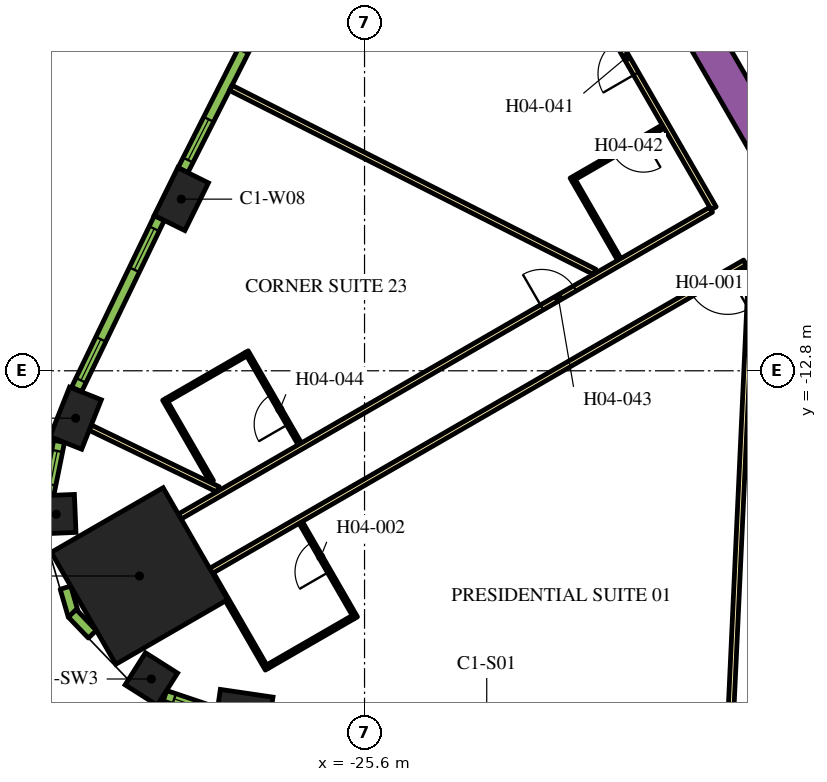
"""IFC4 building model, lengths in metres.
Left out: names, types, materials, properties, quantities, classifications, styles, units other than length and angle.
Written with IfcOpenShell. Run it as: python <this file> out.ifc"""

import sys

from ifc_helpers import new_model, si_unit, direction, frame, frame_2d, origin, origin_2d, place, context, subcontext, project, spatial, rectangle, extrude, element, fill, save


model = new_model("IFC4")
c1 = context("Model", 3, precision=1e-05, world=origin(), true_north=direction((0.0, 1.0)))
c2 = subcontext(c1, "Body", "Model", "MODEL_VIEW")
j1 = project(units=[si_unit("LENGTHUNIT", "METRE"), si_unit("PLANEANGLEUNIT", "RADIAN")], contexts=[c1])
p1 = place(None, origin())
s1 = spatial("IfcSite", under=j1, at=p1, CompositionType="ELEMENT")
p2 = place(p1, origin())
s2 = spatial("IfcBuilding", under=s1, at=p2, CompositionType="ELEMENT")
p3 = place(p2, frame((0.0, 0.0, 70.5)))
s3 = spatial("IfcBuildingStorey", under=s2, at=p3, CompositionType="ELEMENT", Elevation=70.5)
p4 = place(p3, frame((-31.522, -18.199, 0.0), z_axis=(0.0, 0.0, 1.0), x_axis=(-0.866025403784, -0.5, 0.0)))
e1 = element("IfcColumn", 1, at=p4, inside=s3, PredefinedType="COLUMN", context=c2, shape_type="SweptSolid", body=[
    extrude(rectangle(XDim=3.4, YDim=3.4, at=origin_2d()), origin(), (0.0, 0.0, 1.0), 3.9),
])
for number, where, z_axis, x_axis in (
    (2, (-28.767, -21.731, 0.0), (0.0, 0.0, 1.0), (0.989, -0.145, 0.0)),
    (3, (-30.421, -8.284, 0.0), (0.0, 0.0, 1.0), (-0.443, -0.897, 0.0)),
    (4, (-33.203, -14.047, 0.0), (0.0, 0.0, 1.0), (-0.369, -0.929, 0.0)),
):
    element("IfcColumn", number, at=place(p3, frame(where, z_axis=z_axis, x_axis=x_axis)), inside=s3, PredefinedType="COLUMN", context=c2, shape_type="SweptSolid", body=[
        extrude(rectangle(XDim=1.4, YDim=0.9, at=origin_2d()), origin(), (0.0, 0.0, 1.0), 3.9),
    ])
for number, where, z_axis, x_axis in (
    (5, (-33.713, -16.574, 0.0), (0.0, 0.0, 1.0), (0.042, -0.999, 0.0)),
    (6, (-31.21, -20.91, 0.0), (0.0, 0.0, 1.0), (0.844, -0.536, 0.0)),
):
    element("IfcColumn", number, at=place(p3, frame(where, z_axis=z_axis, x_axis=x_axis)), inside=s3, PredefinedType="COLUMN", context=c2, shape_type="SweptSolid", body=[
        extrude(rectangle(XDim=1.0, YDim=1.0, at=origin_2d()), origin(), (0.0, 0.0, 1.0), 3.9),
    ])
p5 = place(p3, frame((-12.134, -11.883, 0.0), z_axis=(0.0, 0.0, 1.0), x_axis=(-0.500005339912, 0.866022320763, 0.0)))
e7 = element("IfcWall", 7, at=p5, inside=s3, PredefinedType="SOLIDWALL", context=c2, shape_type="SweptSolid", body=[
    extrude(rectangle(XDim=9.488, YDim=0.9, at=frame_2d((4.744, 0.0))), origin(), (0.0, 0.0, 1.0), 3.9),
])
p6 = place(p3, frame((-16.412, -8.523, 0.0), z_axis=(0.0, 0.0, 1.0), x_axis=(-0.500001929737, 0.866024289647, 0.0)))
e8 = element("IfcWall", 8, at=p6, inside=s3, PredefinedType="PARTITIONING", context=c2, shape_type="SweptSolid", body=[
    extrude(rectangle(XDim=5.268, YDim=0.15, at=frame_2d((2.634, 0.0))), origin(), (0.0, 0.0, 1.0), 2.75),
])
p7 = place(p6, frame((4.088, 0.0, 0.0)))
e9 = element("IfcOpeningElement", 9, at=p7, cuts=e8, PredefinedType="OPENING", context=c2, shape_type="SweptSolid", body=[
    extrude(rectangle(XDim=1.0, YDim=2.1, at=frame_2d((0.5, 1.05))), frame((0.0, 0.085, 0.0), z_axis=(0.0, -1.0, 0.0), x_axis=(1.0, 0.0, 0.0)), (0.0, 0.0, 1.0), 0.17),
])
p8 = place(p3, frame((-30.463, -16.635, 0.0), z_axis=(0.0, 0.0, 1.0), x_axis=(0.866022394896, 0.500005211512, 0.0)))
e10 = element("IfcWall", 10, at=p8, inside=s3, PredefinedType="PARTITIONING", context=c2, shape_type="SweptSolid", body=[
    extrude(rectangle(XDim=16.144, YDim=0.15, at=frame_2d((8.072, 0.0))), origin(), (0.0, 0.0, 1.0), 2.75),
])
p9 = place(p8, frame((11.004, 0.0, 0.0)))
e11 = element("IfcOpeningElement", 11, at=p9, cuts=e10, PredefinedType="OPENING", context=c2, shape_type="SweptSolid", body=[
    extrude(rectangle(XDim=1.0, YDim=2.1, at=frame_2d((0.5, 1.05))), frame((0.0, 0.085, 0.0), z_axis=(0.0, -1.0, 0.0), x_axis=(1.0, 0.0, 0.0)), (0.0, 0.0, 1.0), 0.17),
])
p10 = place(p3, frame((-15.587, -9.952, 0.0), z_axis=(0.0, 0.0, 1.0), x_axis=(-0.866022197818, -0.500005552856, 0.0)))
e12 = element("IfcWall", 12, at=p10, inside=s3, PredefinedType="PARTITIONING", context=c2, shape_type="SweptSolid", body=[
    extrude(rectangle(XDim=16.224, YDim=0.15, at=frame_2d((8.112, 0.0))), origin(), (0.0, 0.0, 1.0), 2.75),
])
p11 = place(p10, frame((0.527, 0.0, 0.0)))
e13 = element("IfcOpeningElement", 13, at=p11, cuts=e12, PredefinedType="OPENING", context=c2, shape_type="SweptSolid", body=[
    extrude(rectangle(XDim=1.1, YDim=2.1, at=frame_2d((0.55, 1.05))), frame((0.0, 0.085, 0.0), z_axis=(0.0, -1.0, 0.0), x_axis=(1.0, 0.0, 0.0)), (0.0, 0.0, 1.0), 0.17),
])
p12 = place(p3, frame((-12.918, -14.575, 0.0), z_axis=(0.0, 0.0, 1.0), x_axis=(-0.500009150678, 0.866020120573, 0.0)))
e14 = element("IfcWall", 14, at=p12, inside=s3, PredefinedType="PARTITIONING", context=c2, shape_type="SweptSolid", body=[
    extrude(rectangle(XDim=5.258, YDim=0.15, at=frame_2d((2.629, 0.0))), origin(), (0.0, 0.0, 1.0), 2.75),
])
p13 = place(p3, frame((-32.817, -14.296, 0.0), z_axis=(0.0, 0.0, 1.0), x_axis=(0.900616957918, -0.434613730927, 0.0)))
e15 = element("IfcWall", 15, at=p13, inside=s3, PredefinedType="PARTITIONING", context=c2, shape_type="SweptSolid", body=[
    extrude(rectangle(XDim=3.733, YDim=0.15, at=frame_2d((1.867, 0.0))), origin(), (0.0, 0.0, 1.0), 2.75),
])
p14 = place(p3, frame((-29.12, -5.356, 0.0), z_axis=(0.0, 0.0, 1.0), x_axis=(0.892401965553, -0.451241323327, 0.0)))
e16 = element("IfcWall", 16, at=p14, inside=s3, PredefinedType="PARTITIONING", context=c2, shape_type="SweptSolid", body=[
    extrude(rectangle(XDim=10.729, YDim=0.15, at=frame_2d((5.364, 0.0))), origin(), (0.0, 0.0, 1.0), 2.75),
])
p15 = place(p3, frame((-15.973, -22.109, 0.0), z_axis=(0.0, 0.0, 1.0), x_axis=(0.046191717129, 0.998932592955, 0.0)))
e17 = element("IfcWall", 17, at=p15, inside=s3, PredefinedType="PARTITIONING", context=c2, shape_type="SweptSolid", body=[
    extrude(rectangle(XDim=11.638, YDim=0.15, at=frame_2d((5.819, 0.0))), origin(), (0.0, 0.0, 1.0), 2.75),
])
p16 = place(p3, frame((-25.829, -19.3, 0.0), z_axis=(0.0, 0.0, 1.0), x_axis=(-0.50005036918, 0.865996321171, 0.0)))
e18 = element("IfcWall", 18, at=p16, inside=s3, PredefinedType="PARTITIONING", context=c2, shape_type="SweptSolid", body=[
    extrude(rectangle(XDim=2.9, YDim=0.1, at=frame_2d((1.45, 0.0))), origin(), (0.0, 0.0, 1.0), 2.75),
])
p17 = place(p16, frame((1.4, 0.0, 0.0)))
e19 = element("IfcOpeningElement", 19, at=p17, cuts=e18, PredefinedType="OPENING", context=c2, shape_type="SweptSolid", body=[
    extrude(rectangle(XDim=0.9, YDim=2.1, at=frame_2d((0.45, 1.05))), frame((0.0, 0.06, 0.0), z_axis=(0.0, -1.0, 0.0), x_axis=(1.0, 0.0, 0.0)), (0.0, 0.0, 1.0), 0.12),
])
p18 = place(p3, frame((-25.897, -19.282, 0.0), z_axis=(0.0, 0.0, 1.0), x_axis=(-0.866021400173, -0.500006934395, 0.0)))
e20 = element("IfcWall", 20, at=p18, inside=s3, PredefinedType="PARTITIONING", context=c2, shape_type="SweptSolid", body=[
    extrude(rectangle(XDim=2.6, YDim=0.1, at=frame_2d((1.3, 0.0))), origin(), (0.0, 0.0, 1.0), 2.75),
])
p19 = place(p3, frame((-29.617, -18.139, 0.0), z_axis=(0.0, 0.0, 1.0), x_axis=(0.499987231761, -0.866032775405, 0.0)))
e21 = element("IfcWall", 21, at=p19, inside=s3, PredefinedType="PARTITIONING", context=c2, shape_type="SweptSolid", body=[
    extrude(rectangle(XDim=2.9, YDim=0.1, at=frame_2d((1.45, 0.0))), origin(), (0.0, 0.0, 1.0), 2.75),
])
p20 = place(p3, frame((-17.74, -6.373, 0.0), z_axis=(0.0, 0.0, 1.0), x_axis=(-0.866018616679, -0.500011755427, 0.0)))
e22 = element("IfcWall", 22, at=p20, inside=s3, PredefinedType="PARTITIONING", context=c2, shape_type="SweptSolid", body=[
    extrude(rectangle(XDim=2.8, YDim=0.1, at=frame_2d((1.4, 0.0))), origin(), (0.0, 0.0, 1.0), 2.75),
])
p21 = place(p20, frame((0.6, 0.0, 0.0)))
e23 = element("IfcOpeningElement", 23, at=p21, cuts=e22, PredefinedType="OPENING", context=c2, shape_type="SweptSolid", body=[
    extrude(rectangle(XDim=0.9, YDim=2.1, at=frame_2d((0.45, 1.05))), frame((0.0, 0.06, 0.0), z_axis=(0.0, -1.0, 0.0), x_axis=(1.0, 0.0, 0.0)), (0.0, 0.0, 1.0), 0.12),
])
p22 = place(p3, frame((-20.092, -7.8, 0.0), z_axis=(0.0, 0.0, 1.0), x_axis=(0.499940577336, -0.866059708757, 0.0)))
e24 = element("IfcWall", 24, at=p22, inside=s3, PredefinedType="PARTITIONING", context=c2, shape_type="SweptSolid", body=[
    extrude(rectangle(XDim=2.39, YDim=0.1, at=frame_2d((1.195, 0.0))), origin(), (0.0, 0.0, 1.0), 2.75),
])
p23 = place(p3, frame((-27.304, -14.725, 0.0), z_axis=(0.0, 0.0, 1.0), x_axis=(-0.49998411664, 0.866034573852, 0.0)))
e25 = element("IfcWall", 25, at=p23, inside=s3, PredefinedType="PARTITIONING", context=c2, shape_type="SweptSolid", body=[
    extrude(rectangle(XDim=2.8, YDim=0.1, at=frame_2d((1.4, 0.0))), origin(), (0.0, 0.0, 1.0), 2.75),
])
p24 = place(p23, frame((0.6, 0.0, 0.0)))
e26 = element("IfcOpeningElement", 26, at=p24, cuts=e25, PredefinedType="OPENING", context=c2, shape_type="SweptSolid", body=[
    extrude(rectangle(XDim=0.9, YDim=2.1, at=frame_2d((0.45, 1.05))), frame((0.0, 0.06, 0.0), z_axis=(0.0, -1.0, 0.0), x_axis=(1.0, 0.0, 0.0)), (0.0, 0.0, 1.0), 0.12),
])
p25 = place(p3, frame((-28.722, -12.368, 0.0), z_axis=(0.0, 0.0, 1.0), x_axis=(-0.866050077142, -0.499957262057, 0.0)))
e27 = element("IfcWall", 27, at=p25, inside=s3, PredefinedType="PARTITIONING", context=c2, shape_type="SweptSolid", body=[
    extrude(rectangle(XDim=2.4, YDim=0.1, at=frame_2d((1.2, 0.0))), origin(), (0.0, 0.0, 1.0), 2.75),
])
p26 = place(p3, frame((-29.619, -15.715, 0.0), z_axis=(0.0, 0.0, 1.0), x_axis=(-0.500004234368, 0.866022959057, 0.0)))
e28 = element("IfcWall", 28, at=p26, inside=s3, PredefinedType="PARTITIONING", context=c2, shape_type="SweptSolid", body=[
    extrude(rectangle(XDim=2.5, YDim=0.1, at=frame_2d((1.25, 0.0))), origin(), (0.0, 0.0, 1.0), 2.75),
])
p27 = place(p3, frame((-28.122, -3.06, 0.0), z_axis=(0.0, 0.0, 1.0), x_axis=(-0.451233929645, -0.892405704115, 0.0)))
e29 = element("IfcWall", 29, at=p27, inside=s3, PredefinedType="SOLIDWALL", context=c2, shape_type="SweptSolid", body=[
    extrude(rectangle(XDim=4.998, YDim=0.29, at=frame_2d((2.499, 0.0))), origin(), (0.0, 0.0, 1.0), 3.65),
])
p28 = place(p27, frame((0.297, 0.0, 0.9)))
e30 = element("IfcOpeningElement", 30, at=p28, cuts=e29, PredefinedType="OPENING", context=c2, shape_type="SweptSolid", body=[
    extrude(rectangle(XDim=1.2, YDim=2.15, at=frame_2d((0.6, 1.075))), frame((0.0, 0.155, 0.0), z_axis=(0.0, -1.0, 0.0), x_axis=(1.0, 0.0, 0.0)), (0.0, 0.0, 1.0), 0.31),
])
p29 = place(p27, frame((3.501, 0.0, 0.9)))
e31 = element("IfcOpeningElement", 31, at=p29, cuts=e29, PredefinedType="OPENING", context=c2, shape_type="SweptSolid", body=[
    extrude(rectangle(XDim=1.2, YDim=2.15, at=frame_2d((0.6, 1.075))), frame((0.0, 0.155, 0.0), z_axis=(0.0, -1.0, 0.0), x_axis=(1.0, 0.0, 0.0)), (0.0, 0.0, 1.0), 0.31),
])
p30 = place(p3, frame((-31.0, -8.782, 0.0), z_axis=(0.0, 0.0, 1.0), x_axis=(-0.434664499056, -0.900592456808, 0.0)))
e32 = element("IfcWall", 32, at=p30, inside=s3, PredefinedType="SOLIDWALL", context=c2, shape_type="SweptSolid", body=[
    extrude(rectangle(XDim=5.006, YDim=0.29, at=frame_2d((2.503, 0.0))), origin(), (0.0, 0.0, 1.0), 3.65),
])
p31 = place(p30, frame((0.31, 0.0, 0.9)))
e33 = element("IfcOpeningElement", 33, at=p31, cuts=e32, PredefinedType="OPENING", context=c2, shape_type="SweptSolid", body=[
    extrude(rectangle(XDim=1.2, YDim=2.15, at=frame_2d((0.6, 1.075))), frame((0.0, 0.155, 0.0), z_axis=(0.0, -1.0, 0.0), x_axis=(1.0, 0.0, 0.0)), (0.0, 0.0, 1.0), 0.31),
])
p32 = place(p30, frame((3.541, 0.0, 0.9)))
e34 = element("IfcOpeningElement", 34, at=p32, cuts=e32, PredefinedType="OPENING", context=c2, shape_type="SweptSolid", body=[
    extrude(rectangle(XDim=1.2, YDim=2.15, at=frame_2d((0.6, 1.075))), frame((0.0, 0.155, 0.0), z_axis=(0.0, -1.0, 0.0), x_axis=(1.0, 0.0, 0.0)), (0.0, 0.0, 1.0), 0.31),
])
p33 = place(p3, frame((-33.637, -14.657, 0.0), z_axis=(0.0, 0.0, 1.0), x_axis=(-0.198106888228, -0.980180422594, 0.0)))
e35 = element("IfcWall", 35, at=p33, inside=s3, PredefinedType="SOLIDWALL", context=c2, shape_type="SweptSolid", body=[
    extrude(rectangle(XDim=1.415, YDim=0.29, at=frame_2d((0.708, 0.0))), origin(), (0.0, 0.0, 1.0), 3.65),
])
p34 = place(p33, frame((0.257, 0.0, 0.9)))
e36 = element("IfcOpeningElement", 36, at=p34, cuts=e35, PredefinedType="OPENING", context=c2, shape_type="SweptSolid", body=[
    extrude(rectangle(XDim=0.9, YDim=2.15, at=frame_2d((0.45, 1.075))), frame((0.0, 0.155, 0.0), z_axis=(0.0, -1.0, 0.0), x_axis=(1.0, 0.0, 0.0)), (0.0, 0.0, 1.0), 0.31),
])
for number, where, z_axis, x_axis in (
    (37, (-33.47, -18.507, 0.0), (0.0, 0.0, 1.0), (0.279, -0.96, 0.0)),
    (38, (-33.291, -19.181, 0.0), (0.0, 0.0, 1.0), (0.692, -0.722, 0.0)),
):
    element("IfcWall", number, at=place(p3, frame(where, z_axis=z_axis, x_axis=x_axis)), inside=s3, PredefinedType="SOLIDWALL", context=c2, shape_type="SweptSolid", body=[
        extrude(rectangle(XDim=0.764, YDim=0.29, at=frame_2d((0.382, 0.0))), origin(), (0.0, 0.0, 1.0), 3.65),
    ])
p35 = place(p3, frame((-30.853, -21.352, 0.0), z_axis=(0.0, 0.0, 1.0), x_axis=(0.947903891592, -0.318556450734, 0.0)))
e39 = element("IfcWall", 39, at=p35, inside=s3, PredefinedType="SOLIDWALL", context=c2, shape_type="SweptSolid", body=[
    extrude(rectangle(XDim=1.415, YDim=0.29, at=frame_2d((0.708, 0.0))), origin(), (0.0, 0.0, 1.0), 3.65),
])
p36 = place(p35, frame((0.257, 0.0, 0.9)))
e40 = element("IfcOpeningElement", 40, at=p36, cuts=e39, PredefinedType="OPENING", context=c2, shape_type="SweptSolid", body=[
    extrude(rectangle(XDim=0.9, YDim=2.15, at=frame_2d((0.45, 1.075))), frame((0.0, 0.155, 0.0), z_axis=(0.0, -1.0, 0.0), x_axis=(1.0, 0.0, 0.0)), (0.0, 0.0, 1.0), 0.31),
])
p37 = place(p11, origin())
e41 = element("IfcDoor", 41, at=p37, inside=s3, OperationType="SINGLE_SWING_LEFT", PredefinedType="DOOR", context=c2, shape_type="SweptSolid", body=[
    extrude(rectangle(XDim=1.1, YDim=2.1, at=frame_2d((0.55, 1.05))), frame((0.0, 0.025, 0.0), z_axis=(0.0, -1.0, 0.0), x_axis=(1.0, 0.0, 0.0)), (0.0, 0.0, 1.0), 0.05),
])
fill(e13, e41)
p38 = place(p17, origin())
e42 = element("IfcDoor", 42, at=p38, inside=s3, OperationType="SINGLE_SWING_LEFT", PredefinedType="DOOR", context=c2, shape_type="SweptSolid", body=[
    extrude(rectangle(XDim=0.9, YDim=2.1, at=frame_2d((0.45, 1.05))), frame((0.0, 0.025, 0.0), z_axis=(0.0, -1.0, 0.0), x_axis=(1.0, 0.0, 0.0)), (0.0, 0.0, 1.0), 0.05),
])
fill(e19, e42)
p39 = place(p7, origin())
e43 = element("IfcDoor", 43, at=p39, inside=s3, OperationType="SINGLE_SWING_RIGHT", PredefinedType="DOOR", context=c2, shape_type="SweptSolid", body=[
    extrude(rectangle(XDim=1.0, YDim=2.1, at=frame_2d((0.5, 1.05))), frame((0.0, 0.025, 0.0), z_axis=(0.0, -1.0, 0.0), x_axis=(1.0, 0.0, 0.0)), (0.0, 0.0, 1.0), 0.05),
])
fill(e9, e43)
p40 = place(p21, origin())
e44 = element("IfcDoor", 44, at=p40, inside=s3, OperationType="SINGLE_SWING_LEFT", PredefinedType="DOOR", context=c2, shape_type="SweptSolid", body=[
    extrude(rectangle(XDim=0.9, YDim=2.1, at=frame_2d((0.45, 1.05))), frame((0.0, 0.025, 0.0), z_axis=(0.0, -1.0, 0.0), x_axis=(1.0, 0.0, 0.0)), (0.0, 0.0, 1.0), 0.05),
])
fill(e23, e44)
p41 = place(p9, origin())
e45 = element("IfcDoor", 45, at=p41, inside=s3, OperationType="SINGLE_SWING_RIGHT", PredefinedType="DOOR", context=c2, shape_type="SweptSolid", body=[
    extrude(rectangle(XDim=1.0, YDim=2.1, at=frame_2d((0.5, 1.05))), frame((0.0, 0.025, 0.0), z_axis=(0.0, -1.0, 0.0), x_axis=(1.0, 0.0, 0.0)), (0.0, 0.0, 1.0), 0.05),
])
fill(e11, e45)
p42 = place(p24, origin())
e46 = element("IfcDoor", 46, at=p42, inside=s3, OperationType="SINGLE_SWING_LEFT", PredefinedType="DOOR", context=c2, shape_type="SweptSolid", body=[
    extrude(rectangle(XDim=0.9, YDim=2.1, at=frame_2d((0.45, 1.05))), frame((0.0, 0.025, 0.0), z_axis=(0.0, -1.0, 0.0), x_axis=(1.0, 0.0, 0.0)), (0.0, 0.0, 1.0), 0.05),
])
fill(e26, e46)
p43 = place(p29, origin())
e47 = element("IfcWindow", 47, at=p43, inside=s3, PartitioningType="DOUBLE_PANEL_VERTICAL", PredefinedType="WINDOW", context=c2, shape_type="SweptSolid", body=[
    extrude(rectangle(XDim=1.2, YDim=2.15, at=frame_2d((0.6, 1.075))), frame((0.0, 0.015, 0.0), z_axis=(0.0, -1.0, 0.0), x_axis=(1.0, 0.0, 0.0)), (0.0, 0.0, 1.0), 0.06),
])
fill(e31, e47)
p44 = place(p31, origin())
e48 = element("IfcWindow", 48, at=p44, inside=s3, PartitioningType="DOUBLE_PANEL_VERTICAL", PredefinedType="WINDOW", context=c2, shape_type="SweptSolid", body=[
    extrude(rectangle(XDim=1.2, YDim=2.15, at=frame_2d((0.6, 1.075))), frame((0.0, 0.015, 0.0), z_axis=(0.0, -1.0, 0.0), x_axis=(1.0, 0.0, 0.0)), (0.0, 0.0, 1.0), 0.06),
])
fill(e33, e48)
p45 = place(p32, origin())
e49 = element("IfcWindow", 49, at=p45, inside=s3, PartitioningType="DOUBLE_PANEL_VERTICAL", PredefinedType="WINDOW", context=c2, shape_type="SweptSolid", body=[
    extrude(rectangle(XDim=1.2, YDim=2.15, at=frame_2d((0.6, 1.075))), frame((0.0, 0.015, 0.0), z_axis=(0.0, -1.0, 0.0), x_axis=(1.0, 0.0, 0.0)), (0.0, 0.0, 1.0), 0.06),
])
fill(e34, e49)
p46 = place(p34, origin())
e50 = element("IfcWindow", 50, at=p46, inside=s3, PartitioningType="SINGLE_PANEL", PredefinedType="WINDOW", context=c2, shape_type="SweptSolid", body=[
    extrude(rectangle(XDim=0.9, YDim=2.15, at=frame_2d((0.45, 1.075))), frame((0.0, 0.015, 0.0), z_axis=(0.0, -1.0, 0.0), x_axis=(1.0, 0.0, 0.0)), (0.0, 0.0, 1.0), 0.06),
])
fill(e36, e50)
p47 = place(p36, origin())
e51 = element("IfcWindow", 51, at=p47, inside=s3, PartitioningType="SINGLE_PANEL", PredefinedType="WINDOW", context=c2, shape_type="SweptSolid", body=[
    extrude(rectangle(XDim=0.9, YDim=2.15, at=frame_2d((0.45, 1.075))), frame((0.0, 0.015, 0.0), z_axis=(0.0, -1.0, 0.0), x_axis=(1.0, 0.0, 0.0)), (0.0, 0.0, 1.0), 0.06),
])
fill(e40, e51)
save(model, sys.argv[1])
